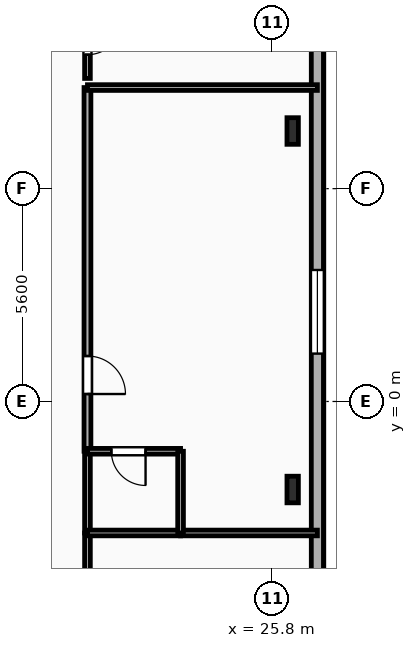
"""IFC4 building model, lengths in metres.
Left out: names, types, materials, properties, quantities, classifications, styles, units other than length and angle.
Written with IfcOpenShell. Run it as: python <this file> out.ifc"""

import sys

from ifc_helpers import new_model, si_unit, direction, frame, frame_2d, origin, origin_2d, place, context, subcontext, project, spatial, rectangle, i_section, extrude, element, fill, save


model = new_model("IFC4")
c1 = context("Model", 3, precision=1e-05, world=origin(), true_north=direction((0.0, 1.0)))
c2 = subcontext(c1, "Body", "Model", "MODEL_VIEW")
j1 = project(units=[si_unit("LENGTHUNIT", "METRE"), si_unit("PLANEANGLEUNIT", "RADIAN")], contexts=[c1])
p1 = place(None, origin())
s1 = spatial("IfcSite", under=j1, at=p1, CompositionType="ELEMENT")
p2 = place(p1, origin())
s2 = spatial("IfcBuilding", under=s1, at=p2, CompositionType="ELEMENT")
p3 = place(p2, frame((0.0, 0.0, 147.75)))
s3 = spatial("IfcBuildingStorey", under=s2, at=p3, CompositionType="ELEMENT", Elevation=147.75)
for number, where, z_axis, x_axis in (
    (1, (26.35, -2.317, 0.0), (0.0, 0.0, 1.0), (1.0, 0.0, 0.0)),
    (2, (26.35, 7.117, 0.0), (0.0, 0.0, 1.0), (1.0, 0.0, 0.0)),
):
    element("IfcColumn", number, at=place(p3, frame(where, z_axis=z_axis, x_axis=x_axis)), inside=s3, PredefinedType="COLUMN", context=c2, shape_type="SweptSolid", body=[
        extrude(i_section(OverallWidth=0.3, OverallDepth=0.7, WebThickness=0.017, FlangeThickness=0.032, FilletRadius=0.027, at=origin_2d()), origin(), (0.0, 0.0, 1.0), 3.35),
    ])
p4 = place(p3, frame((27.0, 17.2, 0.0), z_axis=(0.0, 0.0, 1.0), x_axis=(0.0, -1.0, 0.0)))
e3 = element("IfcWall", 3, at=p4, inside=s3, PredefinedType="SOLIDWALL", context=c2, shape_type="SweptSolid", body=[
    extrude(rectangle(XDim=29.6, YDim=0.32, at=frame_2d((14.8, 0.0))), origin(), (0.0, 0.0, 1.0), 3.04),
])
p5 = place(p4, frame((3.895, 0.0, 0.85)))
e4 = element("IfcOpeningElement", 4, at=p5, cuts=e3, PredefinedType="OPENING", context=c2, shape_type="SweptSolid", body=[
    extrude(rectangle(XDim=1.65, YDim=1.85, at=frame_2d((0.825, 0.925))), frame((0.0, 0.17, 0.0), z_axis=(0.0, -1.0, 0.0), x_axis=(1.0, 0.0, 0.0)), (0.0, 0.0, 1.0), 0.34),
])
p6 = place(p4, frame((13.74, 0.0, 0.85)))
e5 = element("IfcOpeningElement", 5, at=p6, cuts=e3, PredefinedType="OPENING", context=c2, shape_type="SweptSolid", body=[
    extrude(rectangle(XDim=2.2, YDim=1.85, at=frame_2d((1.1, 0.925))), frame((0.0, 0.17, 0.0), z_axis=(0.0, -1.0, 0.0), x_axis=(1.0, 0.0, 0.0)), (0.0, 0.0, 1.0), 0.34),
])
p7 = place(p4, frame((24.135, 0.0, 0.85)))
e6 = element("IfcOpeningElement", 6, at=p7, cuts=e3, PredefinedType="OPENING", context=c2, shape_type="SweptSolid", body=[
    extrude(rectangle(XDim=1.65, YDim=1.85, at=frame_2d((0.825, 0.925))), frame((0.0, 0.17, 0.0), z_axis=(0.0, -1.0, 0.0), x_axis=(1.0, 0.0, 0.0)), (0.0, 0.0, 1.0), 0.34),
])
p8 = place(p3, frame((20.95, 10.65, 0.0), z_axis=(0.0, 0.0, 1.0), x_axis=(0.0, -1.0, 0.0)))
e7 = element("IfcWall", 7, at=p8, inside=s3, PredefinedType="PARTITIONING", context=c2, shape_type="SweptSolid", body=[
    extrude(rectangle(XDim=2.15, YDim=0.15, at=frame_2d((1.075, 0.0))), origin(), (0.0, 0.0, 1.0), 3.04),
])
p9 = place(p8, frame((0.625, 0.0, 0.0)))
e8 = element("IfcOpeningElement", 8, at=p9, cuts=e7, PredefinedType="OPENING", context=c2, shape_type="SweptSolid", body=[
    extrude(rectangle(XDim=0.9, YDim=2.1, at=frame_2d((0.45, 1.05))), frame((0.0, 0.085, 0.0), z_axis=(0.0, -1.0, 0.0), x_axis=(1.0, 0.0, 0.0)), (0.0, 0.0, 1.0), 0.17),
])
p10 = place(p3, frame((20.95, -3.46, 0.0), z_axis=(0.0, 0.0, 1.0), x_axis=(0.0, -1.0, 0.0)))
e9 = element("IfcWall", 9, at=p10, inside=s3, PredefinedType="PARTITIONING", context=c2, shape_type="SweptSolid", body=[
    extrude(rectangle(XDim=2.14, YDim=0.15, at=frame_2d((1.07, 0.0))), origin(), (0.0, 0.0, 1.0), 3.04),
])
p11 = place(p3, frame((20.95, 8.26, 0.0), z_axis=(0.0, 0.0, 1.0), x_axis=(0.0, -1.0, 0.0)))
e10 = element("IfcWall", 10, at=p11, inside=s3, PredefinedType="PARTITIONING", context=c2, shape_type="SweptSolid", body=[
    extrude(rectangle(XDim=9.57, YDim=0.18, at=frame_2d((4.785, 0.0))), origin(), (0.0, 0.0, 1.0), 3.04),
])
p12 = place(p11, frame((7.064, 0.0, 0.0)))
e11 = element("IfcOpeningElement", 11, at=p12, cuts=e10, PredefinedType="OPENING", context=c2, shape_type="SweptSolid", body=[
    extrude(rectangle(XDim=1.0, YDim=2.15, at=frame_2d((0.5, 1.075))), frame((0.0, 0.1, 0.0), z_axis=(0.0, -1.0, 0.0), x_axis=(1.0, 0.0, 0.0)), (0.0, 0.0, 1.0), 0.2),
])
p13 = place(p3, frame((20.95, -1.31, 0.0), z_axis=(0.0, 0.0, 1.0), x_axis=(0.0, -1.0, 0.0)))
e12 = element("IfcWall", 12, at=p13, inside=s3, PredefinedType="PLUMBINGWALL", context=c2, shape_type="SweptSolid", body=[
    extrude(rectangle(XDim=2.15, YDim=0.15, at=frame_2d((1.075, 0.0))), origin(), (0.0, 0.0, 1.0), 3.04),
])
p14 = place(p3, frame((23.4, -3.46, 0.0), z_axis=(0.0, 0.0, 1.0), x_axis=(1.0, 0.0, 0.0)))
e13 = element("IfcWall", 13, at=p14, inside=s3, PredefinedType="PARTITIONING", context=c2, shape_type="SweptSolid", body=[
    extrude(rectangle(XDim=3.6, YDim=0.15, at=frame_2d((1.8, 0.0))), origin(), (0.0, 0.0, 1.0), 3.04),
])
p15 = place(p3, frame((20.95, -3.46, 0.0), z_axis=(0.0, 0.0, 1.0), x_axis=(1.0, 0.0, 0.0)))
e14 = element("IfcWall", 14, at=p15, inside=s3, PredefinedType="PLUMBINGWALL", context=c2, shape_type="SweptSolid", body=[
    extrude(rectangle(XDim=2.45, YDim=0.15, at=frame_2d((1.225, 0.0))), origin(), (0.0, 0.0, 1.0), 3.04),
])
p16 = place(p3, frame((23.4, -1.31, 0.0), z_axis=(0.0, 0.0, 1.0), x_axis=(-1.0, 0.0, 0.0)))
e15 = element("IfcWall", 15, at=p16, inside=s3, PredefinedType="PLUMBINGWALL", context=c2, shape_type="SweptSolid", body=[
    extrude(rectangle(XDim=2.45, YDim=0.15, at=frame_2d((1.225, 0.0))), origin(), (0.0, 0.0, 1.0), 3.04),
])
p17 = place(p16, frame((0.921, 0.0, 0.0)))
e16 = element("IfcOpeningElement", 16, at=p17, cuts=e15, PredefinedType="OPENING", context=c2, shape_type="SweptSolid", body=[
    extrude(rectangle(XDim=0.9, YDim=2.1, at=frame_2d((0.45, 1.05))), frame((0.0, 0.085, 0.0), z_axis=(0.0, -1.0, 0.0), x_axis=(1.0, 0.0, 0.0)), (0.0, 0.0, 1.0), 0.17),
])
p18 = place(p3, frame((23.4, -3.46, 0.0), z_axis=(0.0, 0.0, 1.0), x_axis=(0.0, 1.0, 0.0)))
e17 = element("IfcWall", 17, at=p18, inside=s3, PredefinedType="PLUMBINGWALL", context=c2, shape_type="SweptSolid", body=[
    extrude(rectangle(XDim=2.15, YDim=0.15, at=frame_2d((1.075, 0.0))), origin(), (0.0, 0.0, 1.0), 3.04),
])
p19 = place(p3, frame((20.95, 8.26, 0.0), z_axis=(0.0, 0.0, 1.0), x_axis=(1.0, 0.0, 0.0)))
e18 = element("IfcWall", 18, at=p19, inside=s3, PredefinedType="PARTITIONING", context=c2, shape_type="SweptSolid", body=[
    extrude(rectangle(XDim=6.05, YDim=0.15, at=frame_2d((3.025, 0.0))), origin(), (0.0, 0.0, 1.0), 3.04),
])
p20 = place(p6, origin())
e19 = element("IfcWindow", 19, at=p20, inside=s3, PartitioningType="SINGLE_PANEL", PredefinedType="WINDOW", context=c2, shape_type="SweptSolid", body=[
    extrude(rectangle(XDim=2.2, YDim=1.85, at=frame_2d((1.1, 0.925))), frame((0.0, 0.03, 0.0), z_axis=(0.0, -1.0, 0.0), x_axis=(1.0, 0.0, 0.0)), (0.0, 0.0, 1.0), 0.06),
])
fill(e5, e19)
p21 = place(p9, origin())
e20 = element("IfcDoor", 20, at=p21, inside=s3, OperationType="SINGLE_SWING_LEFT", PredefinedType="DOOR", context=c2, shape_type="SweptSolid", body=[
    extrude(rectangle(XDim=0.9, YDim=2.1, at=frame_2d((0.45, 1.05))), frame((0.0, 0.025, 0.0), z_axis=(0.0, -1.0, 0.0), x_axis=(1.0, 0.0, 0.0)), (0.0, 0.0, 1.0), 0.05),
])
fill(e8, e20)
p22 = place(p12, origin())
e21 = element("IfcDoor", 21, at=p22, inside=s3, OperationType="SINGLE_SWING_RIGHT", PredefinedType="DOOR", context=c2, shape_type="SweptSolid", body=[
    extrude(rectangle(XDim=1.0, YDim=2.15, at=frame_2d((0.5, 1.075))), frame((0.0, 0.025, 0.0), z_axis=(0.0, -1.0, 0.0), x_axis=(1.0, 0.0, 0.0)), (0.0, 0.0, 1.0), 0.05),
])
fill(e11, e21)
p23 = place(p17, origin())
e22 = element("IfcDoor", 22, at=p23, inside=s3, OperationType="SINGLE_SWING_LEFT", PredefinedType="DOOR", context=c2, shape_type="SweptSolid", body=[
    extrude(rectangle(XDim=0.9, YDim=2.1, at=frame_2d((0.45, 1.05))), frame((0.0, 0.025, 0.0), z_axis=(0.0, -1.0, 0.0), x_axis=(1.0, 0.0, 0.0)), (0.0, 0.0, 1.0), 0.05),
])
fill(e16, e22)
save(model, sys.argv[1])
